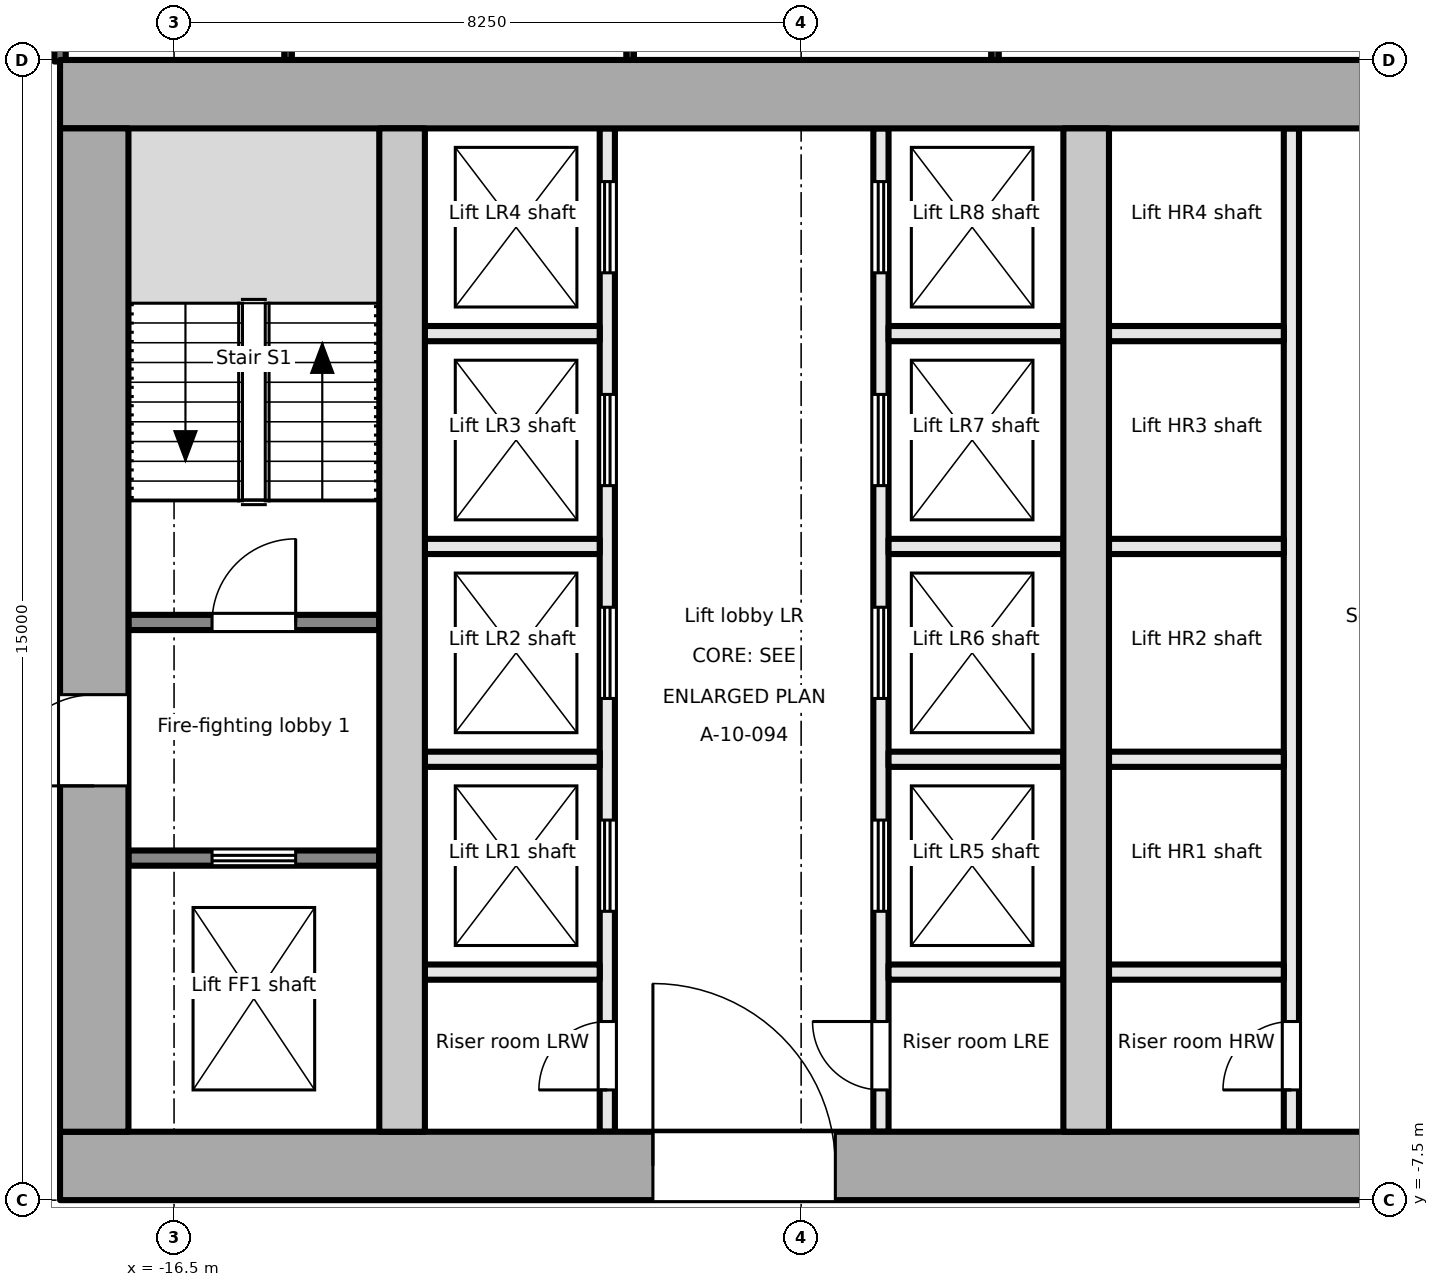
"""IFC4 building model, lengths in metres.
Left out: names, types, materials, properties, quantities, classifications, styles, units other than length and angle.
Written with IfcOpenShell. Run it as: python <this file> out.ifc"""

import sys

from ifc_helpers import new_model, si_unit, direction, frame, frame_2d, origin, place, context, subcontext, project, spatial, rectangle, extrude, element, fill, save


model = new_model("IFC4")
c1 = context("Model", 3, precision=1e-05, world=origin(), true_north=direction((0.0, 1.0)))
c2 = subcontext(c1, "Body", "Model", "MODEL_VIEW")
j1 = project(units=[si_unit("LENGTHUNIT", "METRE"), si_unit("PLANEANGLEUNIT", "RADIAN")], contexts=[c1])
p1 = place(None, origin())
s1 = spatial("IfcSite", under=j1, at=p1, CompositionType="ELEMENT")
p2 = place(p1, origin())
s2 = spatial("IfcBuilding", under=s1, at=p2, CompositionType="ELEMENT")
p3 = place(p2, frame((0.0, 0.0, 111.7)))
s3 = spatial("IfcBuildingStorey", under=s2, at=p3, CompositionType="ELEMENT", Elevation=111.7)
p4 = place(p3, frame((-18.0, -7.05, -0.2), z_axis=(0.0, 0.0, 1.0), x_axis=(1.0, 0.0, 0.0)))
e1 = element("IfcWall", 1, at=p4, inside=s3, PredefinedType="SHEAR", context=c2, shape_type="SweptSolid", body=[
    extrude(rectangle(XDim=36.0, YDim=0.9, at=frame_2d((18.0, 0.0))), origin(), (0.0, 0.0, 1.0), 4.0),
])
p5 = place(p4, frame((7.8, 0.0, 0.2)))
e2 = element("IfcOpeningElement", 2, at=p5, cuts=e1, PredefinedType="OPENING", context=c2, shape_type="SweptSolid", body=[
    extrude(rectangle(XDim=2.4, YDim=2.1, at=frame_2d((1.2, 1.05))), frame((0.0, 0.46, 0.0), z_axis=(0.0, -1.0, 0.0), x_axis=(1.0, 0.0, 0.0)), (0.0, 0.0, 1.0), 0.921),
])
p6 = place(p4, frame((17.4, 0.0, 0.2)))
e3 = element("IfcOpeningElement", 3, at=p6, cuts=e1, PredefinedType="OPENING", context=c2, shape_type="SweptSolid", body=[
    extrude(rectangle(XDim=1.2, YDim=2.1, at=frame_2d((0.6, 1.05))), frame((0.0, 0.46, 0.0), z_axis=(0.0, -1.0, 0.0), x_axis=(1.0, 0.0, 0.0)), (0.0, 0.0, 1.0), 0.921),
])
p7 = place(p4, frame((26.1, 0.0, 0.2)))
e4 = element("IfcOpeningElement", 4, at=p7, cuts=e1, PredefinedType="OPENING", context=c2, shape_type="SweptSolid", body=[
    extrude(rectangle(XDim=2.4, YDim=2.1, at=frame_2d((1.2, 1.05))), frame((0.0, 0.46, 0.0), z_axis=(0.0, -1.0, 0.0), x_axis=(1.0, 0.0, 0.0)), (0.0, 0.0, 1.0), 0.921),
])
p8 = place(p3, frame((-18.0, 7.05, -0.2), z_axis=(0.0, 0.0, 1.0), x_axis=(1.0, 0.0, 0.0)))
e5 = element("IfcWall", 5, at=p8, inside=s3, PredefinedType="SHEAR", context=c2, shape_type="SweptSolid", body=[
    extrude(rectangle(XDim=36.0, YDim=0.9, at=frame_2d((18.0, 0.0))), origin(), (0.0, 0.0, 1.0), 4.0),
])
p9 = place(p3, frame((-17.55, -6.6, -0.2), z_axis=(0.0, 0.0, 1.0), x_axis=(0.0, 1.0, 0.0)))
e6 = element("IfcWall", 6, at=p9, inside=s3, PredefinedType="SHEAR", context=c2, shape_type="SweptSolid", body=[
    extrude(rectangle(XDim=13.2, YDim=0.9, at=frame_2d((6.6, 0.0))), origin(), (0.0, 0.0, 1.0), 4.0),
])
p10 = place(p9, frame((4.55, 0.0, 0.2)))
e7 = element("IfcOpeningElement", 7, at=p10, cuts=e6, PredefinedType="OPENING", context=c2, shape_type="SweptSolid", body=[
    extrude(rectangle(XDim=1.2, YDim=2.1, at=frame_2d((0.6, 1.05))), frame((0.0, 0.46, 0.0), z_axis=(0.0, -1.0, 0.0), x_axis=(1.0, 0.0, 0.0)), (0.0, 0.0, 1.0), 0.921),
])
for number, where, z_axis, x_axis in (
    (8, (-13.5, -6.6, -0.2), (0.0, 0.0, 1.0), (0.0, 1.0, 0.0)),
    (9, (-4.5, -6.6, -0.2), (0.0, 0.0, 1.0), (0.0, 1.0, 0.0)),
):
    element("IfcWall", number, at=place(p3, frame(where, z_axis=z_axis, x_axis=x_axis)), inside=s3, PredefinedType="SHEAR", context=c2, shape_type="SweptSolid", body=[
        extrude(rectangle(XDim=13.2, YDim=0.6, at=frame_2d((6.6, 0.0))), origin(), (0.0, 0.0, 1.0), 4.0),
    ])
p11 = place(p3, frame((-17.1, -3.0, 0.0), z_axis=(0.0, 0.0, 1.0), x_axis=(1.0, 0.0, 0.0)))
e10 = element("IfcWall", 10, at=p11, inside=s3, PredefinedType="PARTITIONING", context=c2, shape_type="SweptSolid", body=[
    extrude(rectangle(XDim=3.3, YDim=0.2, at=frame_2d((1.65, 0.0))), origin(), (0.0, 0.0, 1.0), 3.8),
])
p12 = place(p11, frame((1.1, 0.0, 0.0)))
e11 = element("IfcOpeningElement", 11, at=p12, cuts=e10, PredefinedType="OPENING", context=c2, shape_type="SweptSolid", body=[
    extrude(rectangle(XDim=1.1, YDim=2.1, at=frame_2d((0.55, 1.05))), frame((0.0, 0.111, 0.0), z_axis=(0.0, -1.0, 0.0), x_axis=(1.0, 0.0, 0.0)), (0.0, 0.0, 1.0), 0.221),
])
p13 = place(p3, frame((-17.1, 0.1, 0.0), z_axis=(0.0, 0.0, 1.0), x_axis=(1.0, 0.0, 0.0)))
e12 = element("IfcWall", 12, at=p13, inside=s3, PredefinedType="PARTITIONING", context=c2, shape_type="SweptSolid", body=[
    extrude(rectangle(XDim=3.3, YDim=0.2, at=frame_2d((1.65, 0.0))), origin(), (0.0, 0.0, 1.0), 3.8),
])
p14 = place(p13, frame((1.1, 0.0, 0.0)))
e13 = element("IfcOpeningElement", 13, at=p14, cuts=e12, PredefinedType="OPENING", context=c2, shape_type="SweptSolid", body=[
    extrude(rectangle(XDim=1.1, YDim=2.1, at=frame_2d((0.55, 1.05))), frame((0.0, 0.111, 0.0), z_axis=(0.0, -1.0, 0.0), x_axis=(1.0, 0.0, 0.0)), (0.0, 0.0, 1.0), 0.221),
])
p15 = place(p3, frame((-10.8, -6.6, 0.0), z_axis=(0.0, 0.0, 1.0), x_axis=(0.0, 1.0, 0.0)))
e14 = element("IfcWall", 14, at=p15, inside=s3, PredefinedType="PARTITIONING", context=c2, shape_type="SweptSolid", body=[
    extrude(rectangle(XDim=13.2, YDim=0.2, at=frame_2d((6.6, 0.0))), origin(), (0.0, 0.0, 1.0), 3.8),
])
p16 = place(p15, frame((0.55, 0.0, 0.0)))
e15 = element("IfcOpeningElement", 15, at=p16, cuts=e14, PredefinedType="OPENING", context=c2, shape_type="SweptSolid", body=[
    extrude(rectangle(XDim=0.9, YDim=2.1, at=frame_2d((0.45, 1.05))), frame((0.0, 0.111, 0.0), z_axis=(0.0, -1.0, 0.0), x_axis=(1.0, 0.0, 0.0)), (0.0, 0.0, 1.0), 0.221),
])
p17 = place(p15, frame((2.9, 0.0, 0.0)))
e16 = element("IfcOpeningElement", 16, at=p17, cuts=e14, PredefinedType="OPENING", context=c2, shape_type="SweptSolid", body=[
    extrude(rectangle(XDim=1.2, YDim=2.1, at=frame_2d((0.6, 1.05))), frame((0.0, 0.111, 0.0), z_axis=(0.0, -1.0, 0.0), x_axis=(1.0, 0.0, 0.0)), (0.0, 0.0, 1.0), 0.221),
])
p18 = place(p15, frame((5.7, 0.0, 0.0)))
e17 = element("IfcOpeningElement", 17, at=p18, cuts=e14, PredefinedType="OPENING", context=c2, shape_type="SweptSolid", body=[
    extrude(rectangle(XDim=1.2, YDim=2.1, at=frame_2d((0.6, 1.05))), frame((0.0, 0.111, 0.0), z_axis=(0.0, -1.0, 0.0), x_axis=(1.0, 0.0, 0.0)), (0.0, 0.0, 1.0), 0.221),
])
p19 = place(p15, frame((8.5, 0.0, 0.0)))
e18 = element("IfcOpeningElement", 18, at=p19, cuts=e14, PredefinedType="OPENING", context=c2, shape_type="SweptSolid", body=[
    extrude(rectangle(XDim=1.2, YDim=2.1, at=frame_2d((0.6, 1.05))), frame((0.0, 0.111, 0.0), z_axis=(0.0, -1.0, 0.0), x_axis=(1.0, 0.0, 0.0)), (0.0, 0.0, 1.0), 0.221),
])
p20 = place(p15, frame((11.3, 0.0, 0.0)))
e19 = element("IfcOpeningElement", 19, at=p20, cuts=e14, PredefinedType="OPENING", context=c2, shape_type="SweptSolid", body=[
    extrude(rectangle(XDim=1.2, YDim=2.1, at=frame_2d((0.6, 1.05))), frame((0.0, 0.111, 0.0), z_axis=(0.0, -1.0, 0.0), x_axis=(1.0, 0.0, 0.0)), (0.0, 0.0, 1.0), 0.221),
])
p21 = place(p3, frame((-7.2, -6.6, 0.0), z_axis=(0.0, 0.0, 1.0), x_axis=(0.0, 1.0, 0.0)))
e20 = element("IfcWall", 20, at=p21, inside=s3, PredefinedType="PARTITIONING", context=c2, shape_type="SweptSolid", body=[
    extrude(rectangle(XDim=13.2, YDim=0.2, at=frame_2d((6.6, 0.0))), origin(), (0.0, 0.0, 1.0), 3.8),
])
p22 = place(p21, frame((0.55, 0.0, 0.0)))
e21 = element("IfcOpeningElement", 21, at=p22, cuts=e20, PredefinedType="OPENING", context=c2, shape_type="SweptSolid", body=[
    extrude(rectangle(XDim=0.9, YDim=2.1, at=frame_2d((0.45, 1.05))), frame((0.0, 0.111, 0.0), z_axis=(0.0, -1.0, 0.0), x_axis=(1.0, 0.0, 0.0)), (0.0, 0.0, 1.0), 0.221),
])
p23 = place(p21, frame((2.9, 0.0, 0.0)))
e22 = element("IfcOpeningElement", 22, at=p23, cuts=e20, PredefinedType="OPENING", context=c2, shape_type="SweptSolid", body=[
    extrude(rectangle(XDim=1.2, YDim=2.1, at=frame_2d((0.6, 1.05))), frame((0.0, 0.111, 0.0), z_axis=(0.0, -1.0, 0.0), x_axis=(1.0, 0.0, 0.0)), (0.0, 0.0, 1.0), 0.221),
])
p24 = place(p21, frame((5.7, 0.0, 0.0)))
e23 = element("IfcOpeningElement", 23, at=p24, cuts=e20, PredefinedType="OPENING", context=c2, shape_type="SweptSolid", body=[
    extrude(rectangle(XDim=1.2, YDim=2.1, at=frame_2d((0.6, 1.05))), frame((0.0, 0.111, 0.0), z_axis=(0.0, -1.0, 0.0), x_axis=(1.0, 0.0, 0.0)), (0.0, 0.0, 1.0), 0.221),
])
p25 = place(p21, frame((8.5, 0.0, 0.0)))
e24 = element("IfcOpeningElement", 24, at=p25, cuts=e20, PredefinedType="OPENING", context=c2, shape_type="SweptSolid", body=[
    extrude(rectangle(XDim=1.2, YDim=2.1, at=frame_2d((0.6, 1.05))), frame((0.0, 0.111, 0.0), z_axis=(0.0, -1.0, 0.0), x_axis=(1.0, 0.0, 0.0)), (0.0, 0.0, 1.0), 0.221),
])
p26 = place(p21, frame((11.3, 0.0, 0.0)))
e25 = element("IfcOpeningElement", 25, at=p26, cuts=e20, PredefinedType="OPENING", context=c2, shape_type="SweptSolid", body=[
    extrude(rectangle(XDim=1.2, YDim=2.1, at=frame_2d((0.6, 1.05))), frame((0.0, 0.111, 0.0), z_axis=(0.0, -1.0, 0.0), x_axis=(1.0, 0.0, 0.0)), (0.0, 0.0, 1.0), 0.221),
])
for number, where, z_axis, x_axis in (
    (26, (-13.2, -1.7, 0.0), (0.0, 0.0, 1.0), (1.0, 0.0, 0.0)),
    (27, (-13.2, 1.1, 0.0), (0.0, 0.0, 1.0), (1.0, 0.0, 0.0)),
    (28, (-13.2, 3.9, 0.0), (0.0, 0.0, 1.0), (1.0, 0.0, 0.0)),
    (29, (-13.2, -4.5, 0.0), (0.0, 0.0, 1.0), (1.0, 0.0, 0.0)),
    (30, (-7.1, -1.7, 0.0), (0.0, 0.0, 1.0), (1.0, 0.0, 0.0)),
    (31, (-7.1, 1.1, 0.0), (0.0, 0.0, 1.0), (1.0, 0.0, 0.0)),
    (32, (-7.1, 3.9, 0.0), (0.0, 0.0, 1.0), (1.0, 0.0, 0.0)),
    (33, (-7.1, -4.5, 0.0), (0.0, 0.0, 1.0), (1.0, 0.0, 0.0)),
):
    element("IfcWall", number, at=place(p3, frame(where, z_axis=z_axis, x_axis=x_axis)), inside=s3, PredefinedType="PARTITIONING", context=c2, shape_type="SweptSolid", body=[
        extrude(rectangle(XDim=2.3, YDim=0.2, at=frame_2d((1.15, 0.0))), origin(), (0.0, 0.0, 1.0), 3.8),
    ])
p27 = place(p3, frame((-1.8, -6.6, 0.0), z_axis=(0.0, 0.0, 1.0), x_axis=(0.0, 1.0, 0.0)))
e34 = element("IfcWall", 34, at=p27, inside=s3, PredefinedType="PARTITIONING", context=c2, shape_type="SweptSolid", body=[
    extrude(rectangle(XDim=13.2, YDim=0.2, at=frame_2d((6.6, 0.0))), origin(), (0.0, 0.0, 1.0), 3.8),
])
p28 = place(p27, frame((0.55, 0.0, 0.0)))
e35 = element("IfcOpeningElement", 35, at=p28, cuts=e34, PredefinedType="OPENING", context=c2, shape_type="SweptSolid", body=[
    extrude(rectangle(XDim=0.9, YDim=2.1, at=frame_2d((0.45, 1.05))), frame((0.0, 0.111, 0.0), z_axis=(0.0, -1.0, 0.0), x_axis=(1.0, 0.0, 0.0)), (0.0, 0.0, 1.0), 0.221),
])
for number, where, z_axis, x_axis in (
    (36, (-4.2, -1.7, 0.0), (0.0, 0.0, 1.0), (1.0, 0.0, 0.0)),
    (37, (-4.2, 1.1, 0.0), (0.0, 0.0, 1.0), (1.0, 0.0, 0.0)),
    (38, (-4.2, 3.9, 0.0), (0.0, 0.0, 1.0), (1.0, 0.0, 0.0)),
    (39, (-4.2, -4.5, 0.0), (0.0, 0.0, 1.0), (1.0, 0.0, 0.0)),
):
    element("IfcWall", number, at=place(p3, frame(where, z_axis=z_axis, x_axis=x_axis)), inside=s3, PredefinedType="PARTITIONING", context=c2, shape_type="SweptSolid", body=[
        extrude(rectangle(XDim=2.3, YDim=0.2, at=frame_2d((1.15, 0.0))), origin(), (0.0, 0.0, 1.0), 3.8),
    ])
p29 = place(p3, frame((-18.0, 10.52, 0.0), z_axis=(0.0, 0.0, 1.0), x_axis=(0.0, -1.0, 0.0)))
e40 = element("IfcWall", 40, at=p29, inside=s3, PredefinedType="PARTITIONING", context=c2, shape_type="SweptSolid", body=[
    extrude(rectangle(XDim=3.04, YDim=0.15, at=frame_2d((1.52, 0.0))), origin(), (0.0, 0.0, 1.0), 3.8),
])
p30 = place(p3, frame((-15.0, 7.5, 0.0), z_axis=(0.0, 0.0, 1.0), x_axis=(0.0, 1.0, 0.0)))
e41 = element("IfcWall", 41, at=p30, inside=s3, PredefinedType="PARTITIONING", context=c2, shape_type="SweptSolid", body=[
    extrude(rectangle(XDim=3.0, YDim=0.1, at=frame_2d((1.5, 0.0))), origin(), (0.0, 0.0, 1.0), 3.8),
])
p31 = place(p30, frame((0.76, 0.0, 0.0)))
e42 = element("IfcOpeningElement", 42, at=p31, cuts=e41, PredefinedType="OPENING", context=c2, shape_type="SweptSolid", body=[
    extrude(rectangle(XDim=0.8, YDim=2.1, at=frame_2d((0.4, 1.05))), frame((0.0, 0.061, 0.0), z_axis=(0.0, -1.0, 0.0), x_axis=(1.0, 0.0, 0.0)), (0.0, 0.0, 1.0), 0.121),
])
p32 = place(p3, frame((-10.5, 10.45, 0.0), z_axis=(0.0, 0.0, 1.0), x_axis=(0.0, -1.0, 0.0)))
e43 = element("IfcWall", 43, at=p32, inside=s3, PredefinedType="PARTITIONING", context=c2, shape_type="SweptSolid", body=[
    extrude(rectangle(XDim=2.95, YDim=0.1, at=frame_2d((1.475, 0.0))), origin(), (0.0, 0.0, 1.0), 3.8),
])
p33 = place(p32, frame((1.075, 0.0, 0.0)))
e44 = element("IfcOpeningElement", 44, at=p33, cuts=e43, PredefinedType="OPENING", context=c2, shape_type="SweptSolid", body=[
    extrude(rectangle(XDim=0.8, YDim=2.1, at=frame_2d((0.4, 1.05))), frame((0.0, 0.061, 0.0), z_axis=(0.0, -1.0, 0.0), x_axis=(1.0, 0.0, 0.0)), (0.0, 0.0, 1.0), 0.121),
])
p34 = place(p3, frame((-5.7, 10.45, 0.0), z_axis=(0.0, 0.0, 1.0), x_axis=(0.0, -1.0, 0.0)))
e45 = element("IfcWall", 45, at=p34, inside=s3, PredefinedType="PARTITIONING", context=c2, shape_type="SweptSolid", body=[
    extrude(rectangle(XDim=2.95, YDim=0.1, at=frame_2d((1.475, 0.0))), origin(), (0.0, 0.0, 1.0), 3.8),
])
p35 = place(p34, frame((1.025, 0.0, 0.0)))
e46 = element("IfcOpeningElement", 46, at=p35, cuts=e45, PredefinedType="OPENING", context=c2, shape_type="SweptSolid", body=[
    extrude(rectangle(XDim=0.9, YDim=2.1, at=frame_2d((0.45, 1.05))), frame((0.0, 0.061, 0.0), z_axis=(0.0, -1.0, 0.0), x_axis=(1.0, 0.0, 0.0)), (0.0, 0.0, 1.0), 0.121),
])
p36 = place(p12, origin())
e47 = element("IfcDoor", 47, at=p36, inside=s3, OperationType="DOUBLE_DOOR_SLIDING", PredefinedType="DOOR", context=c2, shape_type="SweptSolid", body=[
    extrude(rectangle(XDim=1.1, YDim=2.1, at=frame_2d((0.55, 1.05))), frame((0.0, 0.025, 0.0), z_axis=(0.0, -1.0, 0.0), x_axis=(1.0, 0.0, 0.0)), (0.0, 0.0, 1.0), 0.05),
])
fill(e11, e47)
p37 = place(p10, origin())
e48 = element("IfcDoor", 48, at=p37, inside=s3, OperationType="SINGLE_SWING_LEFT", PredefinedType="DOOR", context=c2, shape_type="SweptSolid", body=[
    extrude(rectangle(XDim=1.2, YDim=2.1, at=frame_2d((0.6, 1.05))), frame((0.0, 0.025, 0.0), z_axis=(0.0, -1.0, 0.0), x_axis=(1.0, 0.0, 0.0)), (0.0, 0.0, 1.0), 0.05),
])
fill(e7, e48)
p38 = place(p14, origin())
e49 = element("IfcDoor", 49, at=p38, inside=s3, OperationType="SINGLE_SWING_RIGHT", PredefinedType="DOOR", context=c2, shape_type="SweptSolid", body=[
    extrude(rectangle(XDim=1.1, YDim=2.1, at=frame_2d((0.55, 1.05))), frame((0.0, 0.025, 0.0), z_axis=(0.0, -1.0, 0.0), x_axis=(1.0, 0.0, 0.0)), (0.0, 0.0, 1.0), 0.05),
])
fill(e13, e49)
p39 = place(p16, origin())
e50 = element("IfcDoor", 50, at=p39, inside=s3, OperationType="SINGLE_SWING_LEFT", PredefinedType="DOOR", context=c2, shape_type="SweptSolid", body=[
    extrude(rectangle(XDim=0.9, YDim=2.1, at=frame_2d((0.45, 1.05))), frame((0.0, 0.025, 0.0), z_axis=(0.0, -1.0, 0.0), x_axis=(1.0, 0.0, 0.0)), (0.0, 0.0, 1.0), 0.05),
])
fill(e15, e50)
p40 = place(p17, origin())
e51 = element("IfcDoor", 51, at=p40, inside=s3, OperationType="DOUBLE_DOOR_SLIDING", PredefinedType="DOOR", context=c2, shape_type="SweptSolid", body=[
    extrude(rectangle(XDim=1.2, YDim=2.1, at=frame_2d((0.6, 1.05))), frame((0.0, 0.025, 0.0), z_axis=(0.0, -1.0, 0.0), x_axis=(1.0, 0.0, 0.0)), (0.0, 0.0, 1.0), 0.05),
])
fill(e16, e51)
p41 = place(p18, origin())
e52 = element("IfcDoor", 52, at=p41, inside=s3, OperationType="DOUBLE_DOOR_SLIDING", PredefinedType="DOOR", context=c2, shape_type="SweptSolid", body=[
    extrude(rectangle(XDim=1.2, YDim=2.1, at=frame_2d((0.6, 1.05))), frame((0.0, 0.025, 0.0), z_axis=(0.0, -1.0, 0.0), x_axis=(1.0, 0.0, 0.0)), (0.0, 0.0, 1.0), 0.05),
])
fill(e17, e52)
p42 = place(p19, origin())
e53 = element("IfcDoor", 53, at=p42, inside=s3, OperationType="DOUBLE_DOOR_SLIDING", PredefinedType="DOOR", context=c2, shape_type="SweptSolid", body=[
    extrude(rectangle(XDim=1.2, YDim=2.1, at=frame_2d((0.6, 1.05))), frame((0.0, 0.025, 0.0), z_axis=(0.0, -1.0, 0.0), x_axis=(1.0, 0.0, 0.0)), (0.0, 0.0, 1.0), 0.05),
])
fill(e18, e53)
p43 = place(p20, origin())
e54 = element("IfcDoor", 54, at=p43, inside=s3, OperationType="DOUBLE_DOOR_SLIDING", PredefinedType="DOOR", context=c2, shape_type="SweptSolid", body=[
    extrude(rectangle(XDim=1.2, YDim=2.1, at=frame_2d((0.6, 1.05))), frame((0.0, 0.025, 0.0), z_axis=(0.0, -1.0, 0.0), x_axis=(1.0, 0.0, 0.0)), (0.0, 0.0, 1.0), 0.05),
])
fill(e19, e54)
p44 = place(p22, origin())
e55 = element("IfcDoor", 55, at=p44, inside=s3, OperationType="SINGLE_SWING_RIGHT", PredefinedType="DOOR", context=c2, shape_type="SweptSolid", body=[
    extrude(rectangle(XDim=0.9, YDim=2.1, at=frame_2d((0.45, 1.05))), frame((0.0, 0.025, 0.0), z_axis=(0.0, -1.0, 0.0), x_axis=(1.0, 0.0, 0.0)), (0.0, 0.0, 1.0), 0.05),
])
fill(e21, e55)
p45 = place(p23, origin())
e56 = element("IfcDoor", 56, at=p45, inside=s3, OperationType="DOUBLE_DOOR_SLIDING", PredefinedType="DOOR", context=c2, shape_type="SweptSolid", body=[
    extrude(rectangle(XDim=1.2, YDim=2.1, at=frame_2d((0.6, 1.05))), frame((0.0, 0.025, 0.0), z_axis=(0.0, -1.0, 0.0), x_axis=(1.0, 0.0, 0.0)), (0.0, 0.0, 1.0), 0.05),
])
fill(e22, e56)
p46 = place(p24, origin())
e57 = element("IfcDoor", 57, at=p46, inside=s3, OperationType="DOUBLE_DOOR_SLIDING", PredefinedType="DOOR", context=c2, shape_type="SweptSolid", body=[
    extrude(rectangle(XDim=1.2, YDim=2.1, at=frame_2d((0.6, 1.05))), frame((0.0, 0.025, 0.0), z_axis=(0.0, -1.0, 0.0), x_axis=(1.0, 0.0, 0.0)), (0.0, 0.0, 1.0), 0.05),
])
fill(e23, e57)
p47 = place(p25, origin())
e58 = element("IfcDoor", 58, at=p47, inside=s3, OperationType="DOUBLE_DOOR_SLIDING", PredefinedType="DOOR", context=c2, shape_type="SweptSolid", body=[
    extrude(rectangle(XDim=1.2, YDim=2.1, at=frame_2d((0.6, 1.05))), frame((0.0, 0.025, 0.0), z_axis=(0.0, -1.0, 0.0), x_axis=(1.0, 0.0, 0.0)), (0.0, 0.0, 1.0), 0.05),
])
fill(e24, e58)
p48 = place(p26, origin())
e59 = element("IfcDoor", 59, at=p48, inside=s3, OperationType="DOUBLE_DOOR_SLIDING", PredefinedType="DOOR", context=c2, shape_type="SweptSolid", body=[
    extrude(rectangle(XDim=1.2, YDim=2.1, at=frame_2d((0.6, 1.05))), frame((0.0, 0.025, 0.0), z_axis=(0.0, -1.0, 0.0), x_axis=(1.0, 0.0, 0.0)), (0.0, 0.0, 1.0), 0.05),
])
fill(e25, e59)
p49 = place(p5, origin())
e60 = element("IfcDoor", 60, at=p49, inside=s3, OperationType="DOUBLE_DOOR_DOUBLE_SWING", PredefinedType="DOOR", context=c2, shape_type="SweptSolid", body=[
    extrude(rectangle(XDim=2.4, YDim=2.1, at=frame_2d((1.2, 1.05))), frame((0.0, 0.025, 0.0), z_axis=(0.0, -1.0, 0.0), x_axis=(1.0, 0.0, 0.0)), (0.0, 0.0, 1.0), 0.05),
])
fill(e2, e60)
p50 = place(p28, origin())
e61 = element("IfcDoor", 61, at=p50, inside=s3, OperationType="SINGLE_SWING_LEFT", PredefinedType="DOOR", context=c2, shape_type="SweptSolid", body=[
    extrude(rectangle(XDim=0.9, YDim=2.1, at=frame_2d((0.45, 1.05))), frame((0.0, 0.025, 0.0), z_axis=(0.0, -1.0, 0.0), x_axis=(1.0, 0.0, 0.0)), (0.0, 0.0, 1.0), 0.05),
])
fill(e35, e61)
save(model, sys.argv[1])
